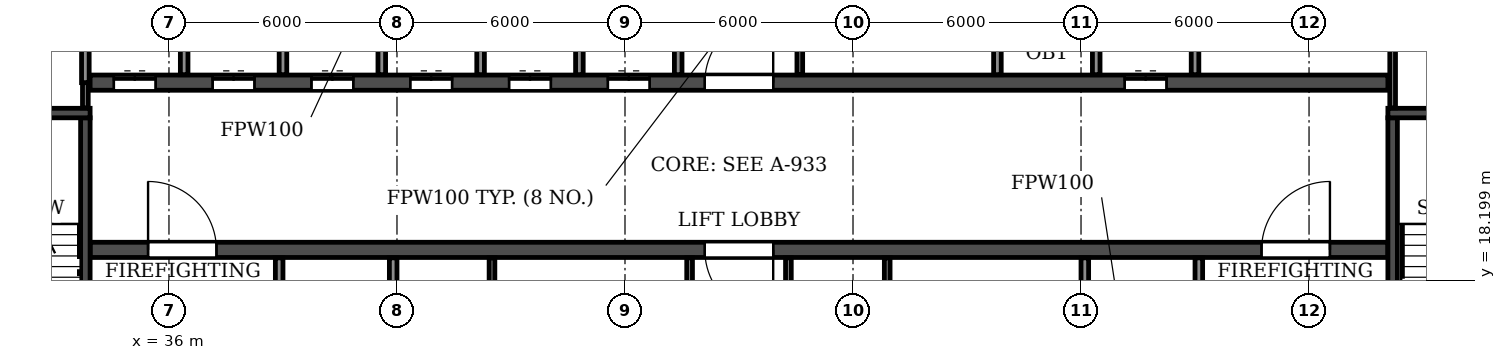
"""IFC4 building model, lengths in metres.
Left out: names, types, materials, properties, quantities, classifications, styles, units other than length and angle.
Written with IfcOpenShell. Run it as: python <this file> out.ifc"""

import sys

from ifc_helpers import new_model, si_unit, direction, frame, frame_2d, origin, place, context, subcontext, project, spatial, rectangle, extrude, element, fill, save


model = new_model("IFC4")
c1 = context("Model", 3, precision=1e-05, world=origin(), true_north=direction((0.0, 1.0)))
c2 = subcontext(c1, "Body", "Model", "MODEL_VIEW")
j1 = project(units=[si_unit("LENGTHUNIT", "METRE"), si_unit("PLANEANGLEUNIT", "RADIAN")], contexts=[c1])
p1 = place(None, origin())
s1 = spatial("IfcSite", under=j1, at=p1, CompositionType="ELEMENT")
p2 = place(p1, origin())
s2 = spatial("IfcBuilding", under=s1, at=p2, CompositionType="ELEMENT")
p3 = place(p2, frame((0.0, 0.0, 181.8)))
s3 = spatial("IfcBuildingStorey", under=s2, at=p3, CompositionType="ELEMENT", Elevation=181.8)
p4 = place(p3, frame((33.925, 19.0, 0.0), z_axis=(0.0, 0.0, 1.0), x_axis=(1.0, 0.0, 0.0)))
e1 = element("IfcWall", 1, at=p4, inside=s3, PredefinedType="SOLIDWALL", context=c2, shape_type="SweptSolid", body=[
    extrude(rectangle(XDim=34.15, YDim=0.4, at=frame_2d((17.075, 0.0))), origin(), (0.0, 0.0, 1.0), 3.08),
])
p5 = place(p4, frame((16.175, 0.0, 0.0)))
e2 = element("IfcOpeningElement", 2, at=p5, cuts=e1, PredefinedType="OPENING", context=c2, shape_type="SweptSolid", body=[
    extrude(rectangle(XDim=1.8, YDim=2.1, at=frame_2d((0.9, 1.05))), frame((0.0, 0.21, 0.0), z_axis=(0.0, -1.0, 0.0), x_axis=(1.0, 0.0, 0.0)), (0.0, 0.0, 1.0), 0.42),
])
p6 = place(p4, frame((1.525, 0.0, 0.0)))
e3 = element("IfcOpeningElement", 3, at=p6, cuts=e1, PredefinedType="OPENING", context=c2, shape_type="SweptSolid", body=[
    extrude(rectangle(XDim=1.8, YDim=2.1, at=frame_2d((0.9, 1.05))), frame((0.0, 0.21, 0.0), z_axis=(0.0, -1.0, 0.0), x_axis=(1.0, 0.0, 0.0)), (0.0, 0.0, 1.0), 0.42),
])
p7 = place(p4, frame((30.825, 0.0, 0.0)))
e4 = element("IfcOpeningElement", 4, at=p7, cuts=e1, PredefinedType="OPENING", context=c2, shape_type="SweptSolid", body=[
    extrude(rectangle(XDim=1.8, YDim=2.1, at=frame_2d((0.9, 1.05))), frame((0.0, 0.21, 0.0), z_axis=(0.0, -1.0, 0.0), x_axis=(1.0, 0.0, 0.0)), (0.0, 0.0, 1.0), 0.42),
])
p8 = place(p3, frame((33.925, 23.4, 0.0), z_axis=(0.0, 0.0, 1.0), x_axis=(1.0, 0.0, 0.0)))
e5 = element("IfcWall", 5, at=p8, inside=s3, PredefinedType="SOLIDWALL", context=c2, shape_type="SweptSolid", body=[
    extrude(rectangle(XDim=34.15, YDim=0.4, at=frame_2d((17.075, 0.0))), origin(), (0.0, 0.0, 1.0), 3.08),
])
p9 = place(p8, frame((16.175, 0.0, 0.0)))
e6 = element("IfcOpeningElement", 6, at=p9, cuts=e5, PredefinedType="OPENING", context=c2, shape_type="SweptSolid", body=[
    extrude(rectangle(XDim=1.8, YDim=2.1, at=frame_2d((0.9, 1.05))), frame((0.0, 0.21, 0.0), z_axis=(0.0, -1.0, 0.0), x_axis=(1.0, 0.0, 0.0)), (0.0, 0.0, 1.0), 0.42),
])
p10 = place(p8, frame((0.625, 0.0, 0.0)))
e7 = element("IfcOpeningElement", 7, at=p10, cuts=e5, PredefinedType="OPENING", context=c2, shape_type="SweptSolid", body=[
    extrude(rectangle(XDim=1.1, YDim=2.1, at=frame_2d((0.55, 1.05))), frame((0.0, 0.21, 0.0), z_axis=(0.0, -1.0, 0.0), x_axis=(1.0, 0.0, 0.0)), (0.0, 0.0, 1.0), 0.42),
])
p11 = place(p8, frame((3.225, 0.0, 0.0)))
e8 = element("IfcOpeningElement", 8, at=p11, cuts=e5, PredefinedType="OPENING", context=c2, shape_type="SweptSolid", body=[
    extrude(rectangle(XDim=1.1, YDim=2.1, at=frame_2d((0.55, 1.05))), frame((0.0, 0.21, 0.0), z_axis=(0.0, -1.0, 0.0), x_axis=(1.0, 0.0, 0.0)), (0.0, 0.0, 1.0), 0.42),
])
p12 = place(p8, frame((5.825, 0.0, 0.0)))
e9 = element("IfcOpeningElement", 9, at=p12, cuts=e5, PredefinedType="OPENING", context=c2, shape_type="SweptSolid", body=[
    extrude(rectangle(XDim=1.1, YDim=2.1, at=frame_2d((0.55, 1.05))), frame((0.0, 0.21, 0.0), z_axis=(0.0, -1.0, 0.0), x_axis=(1.0, 0.0, 0.0)), (0.0, 0.0, 1.0), 0.42),
])
p13 = place(p8, frame((8.425, 0.0, 0.0)))
e10 = element("IfcOpeningElement", 10, at=p13, cuts=e5, PredefinedType="OPENING", context=c2, shape_type="SweptSolid", body=[
    extrude(rectangle(XDim=1.1, YDim=2.1, at=frame_2d((0.55, 1.05))), frame((0.0, 0.21, 0.0), z_axis=(0.0, -1.0, 0.0), x_axis=(1.0, 0.0, 0.0)), (0.0, 0.0, 1.0), 0.42),
])
p14 = place(p8, frame((11.025, 0.0, 0.0)))
e11 = element("IfcOpeningElement", 11, at=p14, cuts=e5, PredefinedType="OPENING", context=c2, shape_type="SweptSolid", body=[
    extrude(rectangle(XDim=1.1, YDim=2.1, at=frame_2d((0.55, 1.05))), frame((0.0, 0.21, 0.0), z_axis=(0.0, -1.0, 0.0), x_axis=(1.0, 0.0, 0.0)), (0.0, 0.0, 1.0), 0.42),
])
p15 = place(p8, frame((13.625, 0.0, 0.0)))
e12 = element("IfcOpeningElement", 12, at=p15, cuts=e5, PredefinedType="OPENING", context=c2, shape_type="SweptSolid", body=[
    extrude(rectangle(XDim=1.1, YDim=2.1, at=frame_2d((0.55, 1.05))), frame((0.0, 0.21, 0.0), z_axis=(0.0, -1.0, 0.0), x_axis=(1.0, 0.0, 0.0)), (0.0, 0.0, 1.0), 0.42),
])
p16 = place(p8, frame((27.225, 0.0, 0.0)))
e13 = element("IfcOpeningElement", 13, at=p16, cuts=e5, PredefinedType="OPENING", context=c2, shape_type="SweptSolid", body=[
    extrude(rectangle(XDim=1.1, YDim=2.1, at=frame_2d((0.55, 1.05))), frame((0.0, 0.21, 0.0), z_axis=(0.0, -1.0, 0.0), x_axis=(1.0, 0.0, 0.0)), (0.0, 0.0, 1.0), 0.42),
])
p17 = place(p3, frame((33.8, 14.8, 0.0), z_axis=(0.0, 0.0, 1.0), x_axis=(0.0, 1.0, 0.0)))
e14 = element("IfcWall", 14, at=p17, inside=s3, PredefinedType="SOLIDWALL", context=c2, shape_type="SweptSolid", body=[
    extrude(rectangle(XDim=7.675, YDim=0.25, at=frame_2d((3.837, 0.0))), origin(), (0.0, 0.0, 1.0), 3.08),
])
p18 = place(p17, frame((0.5, 0.0, 0.0)))
e15 = element("IfcOpeningElement", 15, at=p18, cuts=e14, PredefinedType="OPENING", context=c2, shape_type="SweptSolid", body=[
    extrude(rectangle(XDim=1.0, YDim=2.1, at=frame_2d((0.5, 1.05))), frame((0.0, 0.135, 0.0), z_axis=(0.0, -1.0, 0.0), x_axis=(1.0, 0.0, 0.0)), (0.0, 0.0, 1.0), 0.27),
])
p19 = place(p3, frame((29.875, 22.6, 0.0), z_axis=(0.0, 0.0, 1.0), x_axis=(1.0, 0.0, 0.0)))
e16 = element("IfcWall", 16, at=p19, inside=s3, PredefinedType="SOLIDWALL", context=c2, shape_type="SweptSolid", body=[
    extrude(rectangle(XDim=4.05, YDim=0.25, at=frame_2d((2.025, 0.0))), origin(), (0.0, 0.0, 1.0), 3.08),
])
p20 = place(p3, frame((68.2, 14.8, 0.0), z_axis=(0.0, 0.0, 1.0), x_axis=(0.0, 1.0, 0.0)))
e17 = element("IfcWall", 17, at=p20, inside=s3, PredefinedType="SOLIDWALL", context=c2, shape_type="SweptSolid", body=[
    extrude(rectangle(XDim=7.675, YDim=0.25, at=frame_2d((3.837, 0.0))), origin(), (0.0, 0.0, 1.0), 3.08),
])
p21 = place(p20, frame((0.5, 0.0, 0.0)))
e18 = element("IfcOpeningElement", 18, at=p21, cuts=e17, PredefinedType="OPENING", context=c2, shape_type="SweptSolid", body=[
    extrude(rectangle(XDim=1.0, YDim=2.1, at=frame_2d((0.5, 1.05))), frame((0.0, 0.135, 0.0), z_axis=(0.0, -1.0, 0.0), x_axis=(1.0, 0.0, 0.0)), (0.0, 0.0, 1.0), 0.27),
])
p22 = place(p3, frame((68.075, 22.6, 0.0), z_axis=(0.0, 0.0, 1.0), x_axis=(1.0, 0.0, 0.0)))
e19 = element("IfcWall", 19, at=p22, inside=s3, PredefinedType="SOLIDWALL", context=c2, shape_type="SweptSolid", body=[
    extrude(rectangle(XDim=4.05, YDim=0.25, at=frame_2d((2.025, 0.0))), origin(), (0.0, 0.0, 1.0), 3.08),
])
for number, where, z_axis, x_axis in (
    (20, (49.7, 14.81, 0.0), (0.0, 0.0, 1.0), (0.0, 1.0, 0.0)),
    (21, (52.3, 14.81, 0.0), (0.0, 0.0, 1.0), (0.0, 1.0, 0.0)),
    (22, (52.6, 23.61, 0.0), (0.0, 0.0, 1.0), (0.0, 1.0, 0.0)),
    (23, (44.5, 14.81, 0.0), (0.0, 0.0, 1.0), (0.0, 1.0, 0.0)),
    (24, (54.9, 14.81, 0.0), (0.0, 0.0, 1.0), (0.0, 1.0, 0.0)),
):
    element("IfcWall", number, at=place(p3, frame(where, z_axis=z_axis, x_axis=x_axis)), inside=s3, PredefinedType="PARTITIONING", context=c2, shape_type="SweptSolid", body=[
        extrude(rectangle(XDim=3.98, YDim=0.15, at=frame_2d((1.99, 0.0))), origin(), (0.0, 0.0, 1.0), 3.08),
    ])
p23 = place(p3, frame((33.8, 22.735, 0.0), z_axis=(0.0, 0.0, 1.0), x_axis=(0.0, 1.0, 0.0)))
e25 = element("IfcWall", 25, at=p23, inside=s3, PredefinedType="PARTITIONING", context=c2, shape_type="SweptSolid", body=[
    extrude(rectangle(XDim=0.665, YDim=0.15, at=frame_2d((0.333, 0.0))), origin(), (0.0, 0.0, 1.0), 3.08),
])
p24 = place(p3, frame((68.2, 22.735, 0.0), z_axis=(0.0, 0.0, 1.0), x_axis=(0.0, 1.0, 0.0)))
e26 = element("IfcWall", 26, at=p24, inside=s3, PredefinedType="PARTITIONING", context=c2, shape_type="SweptSolid", body=[
    extrude(rectangle(XDim=4.855, YDim=0.15, at=frame_2d((2.427, 0.0))), origin(), (0.0, 0.0, 1.0), 3.08),
])
p25 = place(p3, frame((33.8, 23.4, 0.0), z_axis=(0.0, 0.0, 1.0), x_axis=(0.0, 1.0, 0.0)))
e27 = element("IfcWall", 27, at=p25, inside=s3, PredefinedType="PARTITIONING", context=c2, shape_type="SweptSolid", body=[
    extrude(rectangle(XDim=2.7, YDim=0.2, at=frame_2d((1.35, 0.0))), origin(), (0.0, 0.0, 1.0), 3.08),
])
p26 = place(p3, frame((36.4, 23.61, 0.0), z_axis=(0.0, 0.0, 1.0), x_axis=(0.0, 1.0, 0.0)))
e28 = element("IfcWall", 28, at=p26, inside=s3, PredefinedType="PARTITIONING", context=c2, shape_type="SweptSolid", body=[
    extrude(rectangle(XDim=2.49, YDim=0.2, at=frame_2d((1.245, 0.0))), origin(), (0.0, 0.0, 1.0), 3.08),
])
p27 = place(p3, frame((38.9, 14.81, 0.0), z_axis=(0.0, 0.0, 1.0), x_axis=(0.0, 1.0, 0.0)))
e29 = element("IfcWall", 29, at=p27, inside=s3, PredefinedType="PARTITIONING", context=c2, shape_type="SweptSolid", body=[
    extrude(rectangle(XDim=3.98, YDim=0.2, at=frame_2d((1.99, 0.0))), origin(), (0.0, 0.0, 1.0), 3.08),
])
p28 = place(p27, frame((1.44, 0.0, 0.0)))
e30 = element("IfcOpeningElement", 30, at=p28, cuts=e29, PredefinedType="OPENING", context=c2, shape_type="SweptSolid", body=[
    extrude(rectangle(XDim=1.1, YDim=2.1, at=frame_2d((0.55, 1.05))), frame((0.0, 0.11, 0.0), z_axis=(0.0, -1.0, 0.0), x_axis=(1.0, 0.0, 0.0)), (0.0, 0.0, 1.0), 0.22),
])
for number, where, z_axis, x_axis in (
    (31, (39.0, 23.61, 0.0), (0.0, 0.0, 1.0), (0.0, 1.0, 0.0)),
    (32, (41.6, 23.61, 0.0), (0.0, 0.0, 1.0), (0.0, 1.0, 0.0)),
):
    element("IfcWall", number, at=place(p3, frame(where, z_axis=z_axis, x_axis=x_axis)), inside=s3, PredefinedType="PARTITIONING", context=c2, shape_type="SweptSolid", body=[
        extrude(rectangle(XDim=2.49, YDim=0.2, at=frame_2d((1.245, 0.0))), origin(), (0.0, 0.0, 1.0), 3.08),
    ])
for number, where, z_axis, x_axis in (
    (33, (41.9, 14.81, 0.0), (0.0, 0.0, 1.0), (0.0, 1.0, 0.0)),
    (34, (44.2, 23.61, 0.0), (0.0, 0.0, 1.0), (0.0, 1.0, 0.0)),
    (35, (46.8, 23.61, 0.0), (0.0, 0.0, 1.0), (0.0, 1.0, 0.0)),
):
    element("IfcWall", number, at=place(p3, frame(where, z_axis=z_axis, x_axis=x_axis)), inside=s3, PredefinedType="PARTITIONING", context=c2, shape_type="SweptSolid", body=[
        extrude(rectangle(XDim=3.98, YDim=0.2, at=frame_2d((1.99, 0.0))), origin(), (0.0, 0.0, 1.0), 3.08),
    ])
for number, where, z_axis, x_axis in (
    (36, (49.4, 23.61, 0.0), (0.0, 0.0, 1.0), (0.0, 1.0, 0.0)),
    (37, (57.8, 23.61, 0.0), (0.0, 0.0, 1.0), (0.0, 1.0, 0.0)),
):
    element("IfcWall", number, at=place(p3, frame(where, z_axis=z_axis, x_axis=x_axis)), inside=s3, PredefinedType="PARTITIONING", context=c2, shape_type="SweptSolid", body=[
        extrude(rectangle(XDim=2.49, YDim=0.2, at=frame_2d((1.245, 0.0))), origin(), (0.0, 0.0, 1.0), 3.08),
    ])
p29 = place(p3, frame((60.1, 14.81, 0.0), z_axis=(0.0, 0.0, 1.0), x_axis=(0.0, 1.0, 0.0)))
e38 = element("IfcWall", 38, at=p29, inside=s3, PredefinedType="PARTITIONING", context=c2, shape_type="SweptSolid", body=[
    extrude(rectangle(XDim=3.98, YDim=0.2, at=frame_2d((1.99, 0.0))), origin(), (0.0, 0.0, 1.0), 3.08),
])
for number, where, z_axis, x_axis in (
    (39, (60.4, 23.61, 0.0), (0.0, 0.0, 1.0), (0.0, 1.0, 0.0)),
    (40, (63.0, 23.61, 0.0), (0.0, 0.0, 1.0), (0.0, 1.0, 0.0)),
):
    element("IfcWall", number, at=place(p3, frame(where, z_axis=z_axis, x_axis=x_axis)), inside=s3, PredefinedType="PARTITIONING", context=c2, shape_type="SweptSolid", body=[
        extrude(rectangle(XDim=2.49, YDim=0.2, at=frame_2d((1.245, 0.0))), origin(), (0.0, 0.0, 1.0), 3.08),
    ])
p30 = place(p3, frame((63.1, 14.81, 0.0), z_axis=(0.0, 0.0, 1.0), x_axis=(0.0, 1.0, 0.0)))
e41 = element("IfcWall", 41, at=p30, inside=s3, PredefinedType="PARTITIONING", context=c2, shape_type="SweptSolid", body=[
    extrude(rectangle(XDim=3.98, YDim=0.2, at=frame_2d((1.99, 0.0))), origin(), (0.0, 0.0, 1.0), 3.08),
])
p31 = place(p30, frame((1.44, 0.0, 0.0)))
e42 = element("IfcOpeningElement", 42, at=p31, cuts=e41, PredefinedType="OPENING", context=c2, shape_type="SweptSolid", body=[
    extrude(rectangle(XDim=1.1, YDim=2.1, at=frame_2d((0.55, 1.05))), frame((0.0, 0.11, 0.0), z_axis=(0.0, -1.0, 0.0), x_axis=(1.0, 0.0, 0.0)), (0.0, 0.0, 1.0), 0.22),
])
p32 = place(p9, origin())
e43 = element("IfcDoor", 43, at=p32, inside=s3, OperationType="DOUBLE_DOOR_SINGLE_SWING", PredefinedType="DOOR", context=c2, shape_type="SweptSolid", body=[
    extrude(rectangle(XDim=1.8, YDim=2.1, at=frame_2d((0.9, 1.05))), frame((0.0, 0.025, 0.0), z_axis=(0.0, -1.0, 0.0), x_axis=(1.0, 0.0, 0.0)), (0.0, 0.0, 1.0), 0.05),
])
fill(e6, e43)
p33 = place(p5, frame((1.8, 0.0, 0.0), z_axis=(0.0, 0.0, 1.0), x_axis=(-1.0, 0.0, 0.0)))
e44 = element("IfcDoor", 44, at=p33, inside=s3, OperationType="DOUBLE_DOOR_SINGLE_SWING", PredefinedType="DOOR", context=c2, shape_type="SweptSolid", body=[
    extrude(rectangle(XDim=1.8, YDim=2.1, at=frame_2d((0.9, 1.05))), frame((0.0, 0.025, 0.0), z_axis=(0.0, -1.0, 0.0), x_axis=(1.0, 0.0, 0.0)), (0.0, 0.0, 1.0), 0.05),
])
fill(e2, e44)
p34 = place(p10, origin())
e45 = element("IfcDoor", 45, at=p34, inside=s3, OperationType="DOUBLE_DOOR_SLIDING", PredefinedType="DOOR", context=c2, shape_type="SweptSolid", body=[
    extrude(rectangle(XDim=1.1, YDim=2.1, at=frame_2d((0.55, 1.05))), frame((0.0, 0.025, 0.0), z_axis=(0.0, -1.0, 0.0), x_axis=(1.0, 0.0, 0.0)), (0.0, 0.0, 1.0), 0.05),
])
fill(e7, e45)
p35 = place(p6, origin())
e46 = element("IfcDoor", 46, at=p35, inside=s3, OperationType="DOUBLE_DOOR_SINGLE_SWING", PredefinedType="DOOR", context=c2, shape_type="SweptSolid", body=[
    extrude(rectangle(XDim=1.8, YDim=2.1, at=frame_2d((0.9, 1.05))), frame((0.0, 0.025, 0.0), z_axis=(0.0, -1.0, 0.0), x_axis=(1.0, 0.0, 0.0)), (0.0, 0.0, 1.0), 0.05),
])
fill(e3, e46)
p36 = place(p11, origin())
e47 = element("IfcDoor", 47, at=p36, inside=s3, OperationType="DOUBLE_DOOR_SLIDING", PredefinedType="DOOR", context=c2, shape_type="SweptSolid", body=[
    extrude(rectangle(XDim=1.1, YDim=2.1, at=frame_2d((0.55, 1.05))), frame((0.0, 0.025, 0.0), z_axis=(0.0, -1.0, 0.0), x_axis=(1.0, 0.0, 0.0)), (0.0, 0.0, 1.0), 0.05),
])
fill(e8, e47)
p37 = place(p12, origin())
e48 = element("IfcDoor", 48, at=p37, inside=s3, OperationType="DOUBLE_DOOR_SLIDING", PredefinedType="DOOR", context=c2, shape_type="SweptSolid", body=[
    extrude(rectangle(XDim=1.1, YDim=2.1, at=frame_2d((0.55, 1.05))), frame((0.0, 0.025, 0.0), z_axis=(0.0, -1.0, 0.0), x_axis=(1.0, 0.0, 0.0)), (0.0, 0.0, 1.0), 0.05),
])
fill(e9, e48)
p38 = place(p13, origin())
e49 = element("IfcDoor", 49, at=p38, inside=s3, OperationType="DOUBLE_DOOR_SLIDING", PredefinedType="DOOR", context=c2, shape_type="SweptSolid", body=[
    extrude(rectangle(XDim=1.1, YDim=2.1, at=frame_2d((0.55, 1.05))), frame((0.0, 0.025, 0.0), z_axis=(0.0, -1.0, 0.0), x_axis=(1.0, 0.0, 0.0)), (0.0, 0.0, 1.0), 0.05),
])
fill(e10, e49)
p39 = place(p14, origin())
e50 = element("IfcDoor", 50, at=p39, inside=s3, OperationType="DOUBLE_DOOR_SLIDING", PredefinedType="DOOR", context=c2, shape_type="SweptSolid", body=[
    extrude(rectangle(XDim=1.1, YDim=2.1, at=frame_2d((0.55, 1.05))), frame((0.0, 0.025, 0.0), z_axis=(0.0, -1.0, 0.0), x_axis=(1.0, 0.0, 0.0)), (0.0, 0.0, 1.0), 0.05),
])
fill(e11, e50)
p40 = place(p15, origin())
e51 = element("IfcDoor", 51, at=p40, inside=s3, OperationType="DOUBLE_DOOR_SLIDING", PredefinedType="DOOR", context=c2, shape_type="SweptSolid", body=[
    extrude(rectangle(XDim=1.1, YDim=2.1, at=frame_2d((0.55, 1.05))), frame((0.0, 0.025, 0.0), z_axis=(0.0, -1.0, 0.0), x_axis=(1.0, 0.0, 0.0)), (0.0, 0.0, 1.0), 0.05),
])
fill(e12, e51)
p41 = place(p16, origin())
e52 = element("IfcDoor", 52, at=p41, inside=s3, OperationType="DOUBLE_DOOR_SLIDING", PredefinedType="DOOR", context=c2, shape_type="SweptSolid", body=[
    extrude(rectangle(XDim=1.1, YDim=2.1, at=frame_2d((0.55, 1.05))), frame((0.0, 0.025, 0.0), z_axis=(0.0, -1.0, 0.0), x_axis=(1.0, 0.0, 0.0)), (0.0, 0.0, 1.0), 0.05),
])
fill(e13, e52)
p42 = place(p7, origin())
e53 = element("IfcDoor", 53, at=p42, inside=s3, OperationType="DOUBLE_DOOR_SINGLE_SWING", PredefinedType="DOOR", context=c2, shape_type="SweptSolid", body=[
    extrude(rectangle(XDim=1.8, YDim=2.1, at=frame_2d((0.9, 1.05))), frame((0.0, 0.025, 0.0), z_axis=(0.0, -1.0, 0.0), x_axis=(1.0, 0.0, 0.0)), (0.0, 0.0, 1.0), 0.05),
])
fill(e4, e53)
save(model, sys.argv[1])
